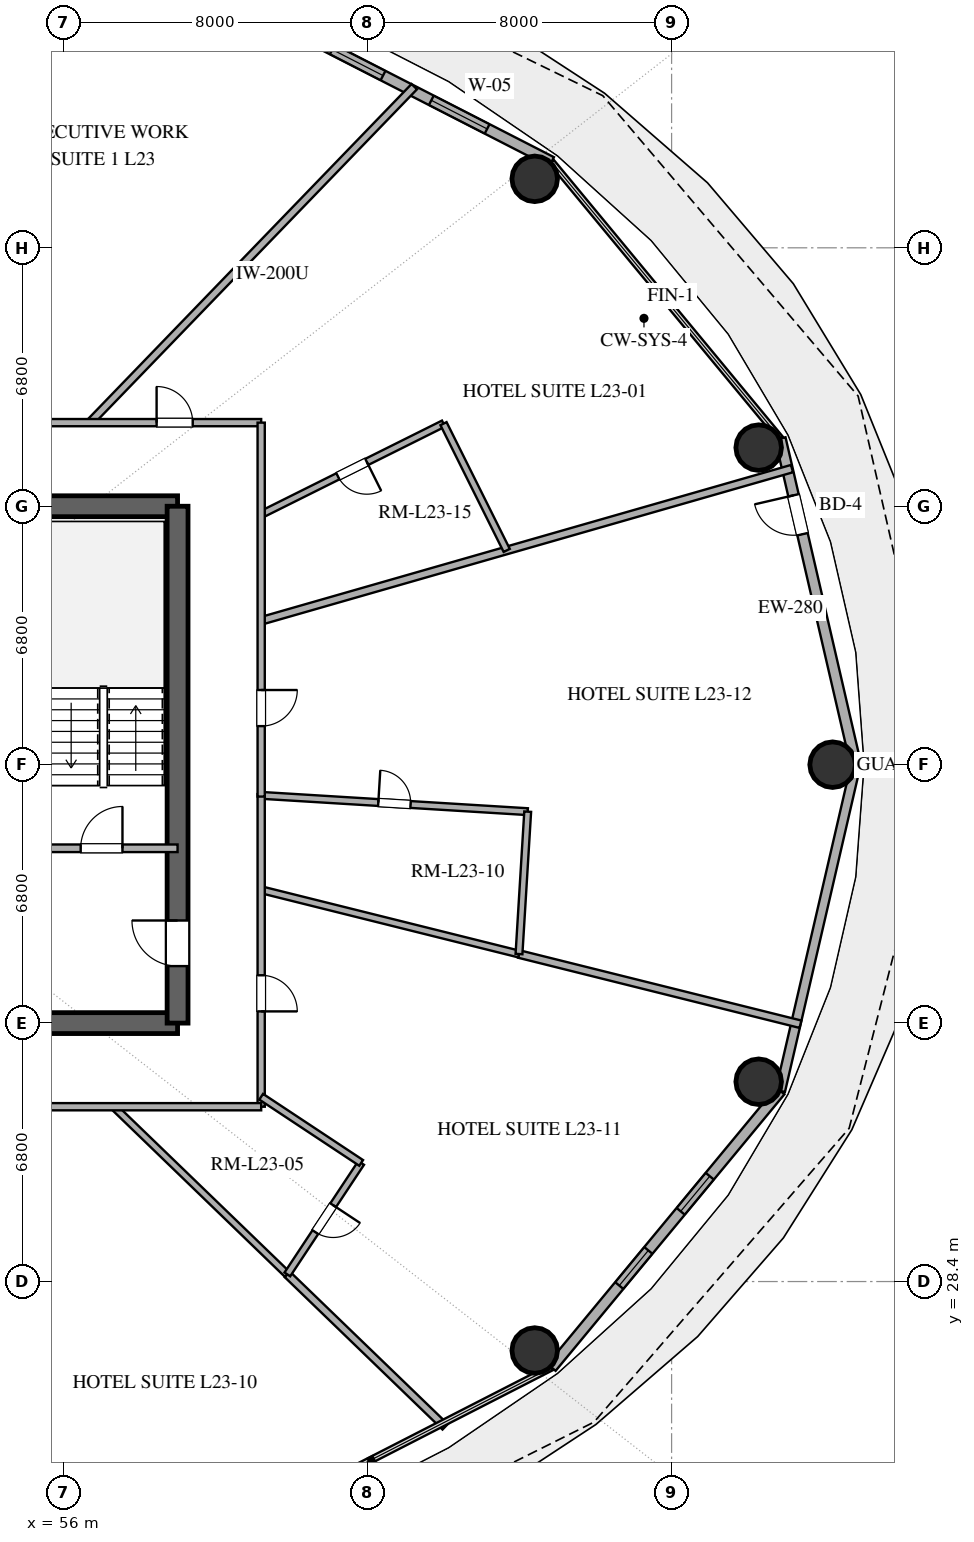
"""IFC4 building model, lengths in metres.
Left out: names, types, materials, properties, quantities, classifications, styles, units other than length and angle.
Written with IfcOpenShell. Run it as: python <this file> out.ifc"""

import sys

from ifc_helpers import new_model, si_unit, direction, frame, frame_2d, origin, origin_2d, place, context, subcontext, project, spatial, rectangle, hollow_circle, extrude, element, fill, save


model = new_model("IFC4")
c1 = context("Model", 3, precision=1e-05, world=origin(), true_north=direction((0.0, 1.0)))
c2 = subcontext(c1, "Body", "Model", "MODEL_VIEW")
j1 = project(units=[si_unit("LENGTHUNIT", "METRE"), si_unit("PLANEANGLEUNIT", "RADIAN")], contexts=[c1])
p1 = place(None, origin())
s1 = spatial("IfcSite", under=j1, at=p1, CompositionType="ELEMENT")
p2 = place(p1, origin())
s2 = spatial("IfcBuilding", under=s1, at=p2, CompositionType="ELEMENT")
p3 = place(p2, frame((0.0, 0.0, 94.8)))
s3 = spatial("IfcBuildingStorey", under=s2, at=p3, CompositionType="ELEMENT", Elevation=94.8)
for number, where, z_axis, x_axis in (
    (1, (55.0, 35.2, 0.0), (0.0, 0.0, 1.0), (1.0, 0.0, 0.0)),
    (2, (55.0, 48.8, 0.0), (0.0, 0.0, 1.0), (1.0, 0.0, 0.0)),
):
    element("IfcWall", number, at=place(p3, frame(where, z_axis=z_axis, x_axis=x_axis)), inside=s3, PredefinedType="SHEAR", context=c2, shape_type="SweptSolid", body=[
        extrude(rectangle(XDim=4.0, YDim=0.55, at=frame_2d((2.0, 0.0))), origin(), (0.0, 0.0, 1.0), 3.38),
    ])
p4 = place(p3, frame((59.0, 35.2, 0.0), z_axis=(0.0, 0.0, 1.0), x_axis=(0.0, 1.0, 0.0)))
e3 = element("IfcWall", 3, at=p4, inside=s3, PredefinedType="SHEAR", context=c2, shape_type="SweptSolid", body=[
    extrude(rectangle(XDim=13.6, YDim=0.55, at=frame_2d((6.8, 0.0))), origin(), (0.0, 0.0, 1.0), 3.38),
])
p5 = place(p4, frame((1.5, 0.0, 0.0)))
e4 = element("IfcOpeningElement", 4, at=p5, cuts=e3, PredefinedType="OPENING", context=c2, shape_type="SweptSolid", body=[
    extrude(rectangle(XDim=1.2, YDim=2.15, at=frame_2d((0.6, 1.075))), frame((0.0, 0.285, 0.0), z_axis=(0.0, -1.0, 0.0), x_axis=(1.0, 0.0, 0.0)), (0.0, 0.0, 1.0), 0.57),
])
for number, where, z_axis, x_axis in (
    (5, (76.237, 42.0, 0.0), (0.0, 0.0, 1.0), (1.0, 0.0, 0.0)),
    (6, (74.291, 50.343, 0.0), (0.0, 0.0, 1.0), (1.0, 0.0, 0.0)),
    (7, (68.398, 57.415, 0.0), (0.0, 0.0, 1.0), (1.0, 0.0, 0.0)),
    (8, (68.398, 26.585, 0.0), (0.0, 0.0, 1.0), (1.0, 0.0, 0.0)),
    (9, (74.291, 33.657, 0.0), (0.0, 0.0, 1.0), (1.0, 0.0, 0.0)),
):
    element("IfcColumn", number, at=place(p3, frame(where, z_axis=z_axis, x_axis=x_axis)), inside=s3, PredefinedType="COLUMN", context=c2, shape_type="SweptSolid", body=[
        extrude(hollow_circle(Radius=0.6, WallThickness=0.032, at=origin_2d()), origin(), (0.0, 0.0, 1.0), 3.38),
    ])
p6 = place(p3, frame((76.849, 42.0, 0.0), z_axis=(0.0, 0.0, 1.0), x_axis=(-0.22558597182, 0.974223264616, 0.0)))
e10 = element("IfcWall", 10, at=p6, inside=s3, PredefinedType="SOLIDWALL", context=c2, shape_type="SweptSolid", body=[
    extrude(rectangle(XDim=8.811, YDim=0.28, at=frame_2d((4.405, 0.0))), origin(), (0.0, 0.0, 1.0), 3.38),
])
p7 = place(p6, frame((6.225, 0.0, 0.0)))
e11 = element("IfcOpeningElement", 11, at=p7, cuts=e10, PredefinedType="OPENING", context=c2, shape_type="SweptSolid", body=[
    extrude(rectangle(XDim=1.05, YDim=2.2, at=frame_2d((0.525, 1.1))), frame((0.0, 0.15, 0.0), z_axis=(0.0, -1.0, 0.0), x_axis=(1.0, 0.0, 0.0)), (0.0, 0.0, 1.0), 0.3),
])
p8 = place(p3, frame((68.84, 57.86, 0.0), z_axis=(0.0, 0.0, 1.0), x_axis=(-0.889959505023, 0.45603955905, 0.0)))
e12 = element("IfcWall", 12, at=p8, inside=s3, PredefinedType="SOLIDWALL", context=c2, shape_type="SweptSolid", body=[
    extrude(rectangle(XDim=10.662, YDim=0.28, at=frame_2d((5.331, 0.0))), origin(), (0.0, 0.0, 1.0), 3.38),
])
p9 = place(p8, frame((1.904, 0.0, 0.85)))
e13 = element("IfcOpeningElement", 13, at=p9, cuts=e12, PredefinedType="OPENING", context=c2, shape_type="SweptSolid", body=[
    extrude(rectangle(XDim=1.65, YDim=2.0, at=frame_2d((0.825, 1.0))), frame((0.0, 0.15, 0.0), z_axis=(0.0, -1.0, 0.0), x_axis=(1.0, 0.0, 0.0)), (0.0, 0.0, 1.0), 0.3),
])
p10 = place(p8, frame((4.982, 0.0, 0.85)))
e14 = element("IfcOpeningElement", 14, at=p10, cuts=e12, PredefinedType="OPENING", context=c2, shape_type="SweptSolid", body=[
    extrude(rectangle(XDim=1.5, YDim=2.0, at=frame_2d((0.75, 1.0))), frame((0.0, 0.15, 0.0), z_axis=(0.0, -1.0, 0.0), x_axis=(1.0, 0.0, 0.0)), (0.0, 0.0, 1.0), 0.3),
])
p11 = place(p8, frame((7.096, 0.0, 0.85)))
e15 = element("IfcOpeningElement", 15, at=p11, cuts=e12, PredefinedType="OPENING", context=c2, shape_type="SweptSolid", body=[
    extrude(rectangle(XDim=1.5, YDim=2.0, at=frame_2d((0.75, 1.0))), frame((0.0, 0.15, 0.0), z_axis=(0.0, -1.0, 0.0), x_axis=(1.0, 0.0, 0.0)), (0.0, 0.0, 1.0), 0.3),
])
p12 = place(p3, frame((68.84, 26.14, 0.0), z_axis=(0.0, 0.0, 1.0), x_axis=(0.637505817448, 0.770445541696, 0.0)))
e16 = element("IfcWall", 16, at=p12, inside=s3, PredefinedType="SOLIDWALL", context=c2, shape_type="SweptSolid", body=[
    extrude(rectangle(XDim=9.445, YDim=0.28, at=frame_2d((4.723, 0.0))), origin(), (0.0, 0.0, 1.0), 3.38),
])
p13 = place(p12, frame((2.797, 0.0, 0.85)))
e17 = element("IfcOpeningElement", 17, at=p13, cuts=e16, PredefinedType="OPENING", context=c2, shape_type="SweptSolid", body=[
    extrude(rectangle(XDim=1.2, YDim=1.8, at=frame_2d((0.6, 0.9))), frame((0.0, 0.15, 0.0), z_axis=(0.0, -1.0, 0.0), x_axis=(1.0, 0.0, 0.0)), (0.0, 0.0, 1.0), 0.3),
])
p14 = place(p12, frame((5.332, 0.0, 0.85)))
e18 = element("IfcOpeningElement", 18, at=p14, cuts=e16, PredefinedType="OPENING", context=c2, shape_type="SweptSolid", body=[
    extrude(rectangle(XDim=1.2, YDim=1.8, at=frame_2d((0.6, 0.9))), frame((0.0, 0.15, 0.0), z_axis=(0.0, -1.0, 0.0), x_axis=(1.0, 0.0, 0.0)), (0.0, 0.0, 1.0), 0.3),
])
p15 = place(p3, frame((74.861, 33.417, 0.0), z_axis=(0.0, 0.0, 1.0), x_axis=(0.22558597182, 0.974223264616, 0.0)))
e19 = element("IfcWall", 19, at=p15, inside=s3, PredefinedType="SOLIDWALL", context=c2, shape_type="SweptSolid", body=[
    extrude(rectangle(XDim=8.811, YDim=0.25, at=frame_2d((4.405, 0.0))), origin(), (0.0, 0.0, 1.0), 3.38),
])
p16 = place(p3, frame((55.0, 39.8, 0.0), z_axis=(0.0, 0.0, 1.0), x_axis=(1.0, 0.0, 0.0)))
e20 = element("IfcWall", 20, at=p16, inside=s3, PredefinedType="SOLIDWALL", context=c2, shape_type="SweptSolid", body=[
    extrude(rectangle(XDim=4.0, YDim=0.2, at=frame_2d((2.0, 0.0))), origin(), (0.0, 0.0, 1.0), 2.74),
])
p17 = place(p16, frame((1.45, 0.0, 0.0)))
e21 = element("IfcOpeningElement", 21, at=p17, cuts=e20, PredefinedType="OPENING", context=c2, shape_type="SweptSolid", body=[
    extrude(rectangle(XDim=1.1, YDim=2.15, at=frame_2d((0.55, 1.075))), frame((0.0, 0.11, 0.0), z_axis=(0.0, -1.0, 0.0), x_axis=(1.0, 0.0, 0.0)), (0.0, 0.0, 1.0), 0.22),
])
p18 = place(p3, frame((65.228, 59.84, 0.0), z_axis=(0.0, 0.0, 1.0), x_axis=(-0.694672506389, -0.719326149161, 0.0)))
e22 = element("IfcWall", 22, at=p18, inside=s3, PredefinedType="PARTITIONING", context=c2, shape_type="SweptSolid", body=[
    extrude(rectangle(XDim=12.289, YDim=0.2, at=frame_2d((6.145, 0.0))), origin(), (0.0, 0.0, 1.0), 2.74),
])
p19 = place(p3, frame((61.2, 45.785, 0.0), z_axis=(0.0, 0.0, 1.0), x_axis=(0.961261030421, 0.275639676741, 0.0)))
e23 = element("IfcWall", 23, at=p19, inside=s3, PredefinedType="PARTITIONING", context=c2, shape_type="SweptSolid", body=[
    extrude(rectangle(XDim=14.531, YDim=0.2, at=frame_2d((7.266, 0.0))), origin(), (0.0, 0.0, 1.0), 2.74),
])
p20 = place(p3, frame((75.391, 35.171, 0.0), z_axis=(0.0, 0.0, 1.0), x_axis=(-0.970302209845, 0.241895889938, 0.0)))
e24 = element("IfcWall", 24, at=p20, inside=s3, PredefinedType="PARTITIONING", context=c2, shape_type="SweptSolid", body=[
    extrude(rectangle(XDim=7.633, YDim=0.2, at=frame_2d((3.817, 0.0))), origin(), (0.0, 0.0, 1.0), 2.74),
])
p21 = place(p3, frame((61.2, 41.193, 0.0), z_axis=(0.0, 0.0, 1.0), x_axis=(0.998134708281, -0.061050013314, 0.0)))
e25 = element("IfcWall", 25, at=p21, inside=s3, PredefinedType="PLUMBINGWALL", context=c2, shape_type="SweptSolid", body=[
    extrude(rectangle(XDim=7.026, YDim=0.18, at=frame_2d((3.513, 0.0))), origin(), (0.0, 0.0, 1.0), 2.74),
])
p22 = place(p21, frame((3.088, 0.0, 0.0)))
e26 = element("IfcOpeningElement", 26, at=p22, cuts=e25, PredefinedType="OPENING", context=c2, shape_type="SweptSolid", body=[
    extrude(rectangle(XDim=0.85, YDim=2.1, at=frame_2d((0.425, 1.05))), frame((0.0, 0.1, 0.0), z_axis=(0.0, -1.0, 0.0), x_axis=(1.0, 0.0, 0.0)), (0.0, 0.0, 1.0), 0.2),
])
p23 = place(p3, frame((67.984, 37.017, 0.0), z_axis=(0.0, 0.0, 1.0), x_axis=(-0.970290206094, 0.241944034764, 0.0)))
e27 = element("IfcWall", 27, at=p23, inside=s3, PredefinedType="PLUMBINGWALL", context=c2, shape_type="SweptSolid", body=[
    extrude(rectangle(XDim=6.992, YDim=0.18, at=frame_2d((3.496, 0.0))), origin(), (0.0, 0.0, 1.0), 2.74),
])
p24 = place(p3, frame((48.518, 51.0, 0.0), z_axis=(0.0, 0.0, 1.0), x_axis=(1.0, 0.0, 0.0)))
e28 = element("IfcWall", 28, at=p24, inside=s3, PredefinedType="PARTITIONING", context=c2, shape_type="SweptSolid", body=[
    extrude(rectangle(XDim=12.682, YDim=0.19, at=frame_2d((6.341, 0.0))), origin(), (0.0, 0.0, 1.0), 2.74),
])
p25 = place(p24, frame((4.455, 0.0, 0.0)))
e29 = element("IfcOpeningElement", 29, at=p25, cuts=e28, PredefinedType="OPENING", context=c2, shape_type="SweptSolid", body=[
    extrude(rectangle(XDim=1.0, YDim=2.2, at=frame_2d((0.5, 1.1))), frame((0.0, 0.105, 0.0), z_axis=(0.0, -1.0, 0.0), x_axis=(1.0, 0.0, 0.0)), (0.0, 0.0, 1.0), 0.21),
])
p26 = place(p24, frame((9.93, 0.0, 0.0)))
e30 = element("IfcOpeningElement", 30, at=p26, cuts=e28, PredefinedType="OPENING", context=c2, shape_type="SweptSolid", body=[
    extrude(rectangle(XDim=0.95, YDim=2.15, at=frame_2d((0.475, 1.075))), frame((0.0, 0.105, 0.0), z_axis=(0.0, -1.0, 0.0), x_axis=(1.0, 0.0, 0.0)), (0.0, 0.0, 1.0), 0.21),
])
p27 = place(p3, frame((61.889, 28.587, 0.0), z_axis=(0.0, 0.0, 1.0), x_axis=(-0.719318009274, 0.694680935059, 0.0)))
e31 = element("IfcWall", 31, at=p27, inside=s3, PredefinedType="PLUMBINGWALL", context=c2, shape_type="SweptSolid", body=[
    extrude(rectangle(XDim=6.352, YDim=0.18, at=frame_2d((3.176, 0.0))), origin(), (0.0, 0.0, 1.0), 2.74),
])
p28 = place(p3, frame((66.041, 24.578, 0.0), z_axis=(0.0, 0.0, 1.0), x_axis=(-0.719370121813, 0.694626970281, 0.0)))
e32 = element("IfcWall", 32, at=p28, inside=s3, PredefinedType="PARTITIONING", context=c2, shape_type="SweptSolid", body=[
    extrude(rectangle(XDim=5.772, YDim=0.2, at=frame_2d((2.886, 0.0))), origin(), (0.0, 0.0, 1.0), 2.74),
])
p29 = place(p3, frame((61.2, 41.225, 0.0), z_axis=(0.0, 0.0, 1.0), x_axis=(0.0, -1.0, 0.0)))
e33 = element("IfcWall", 33, at=p29, inside=s3, PredefinedType="PARTITIONING", context=c2, shape_type="SweptSolid", body=[
    extrude(rectangle(XDim=8.225, YDim=0.19, at=frame_2d((4.112, 0.0))), origin(), (0.0, 0.0, 1.0), 2.74),
])
p30 = place(p29, frame((4.767, 0.0, 0.0)))
e34 = element("IfcOpeningElement", 34, at=p30, cuts=e33, PredefinedType="OPENING", context=c2, shape_type="SweptSolid", body=[
    extrude(rectangle(XDim=0.95, YDim=2.15, at=frame_2d((0.475, 1.075))), frame((0.0, 0.105, 0.0), z_axis=(0.0, -1.0, 0.0), x_axis=(1.0, 0.0, 0.0)), (0.0, 0.0, 1.0), 0.21),
])
p31 = place(p3, frame((65.998, 50.973, 0.0), z_axis=(0.0, 0.0, 1.0), x_axis=(-0.894936648514, -0.446193226244, 0.0)))
e35 = element("IfcWall", 35, at=p31, inside=s3, PredefinedType="PLUMBINGWALL", context=c2, shape_type="SweptSolid", body=[
    extrude(rectangle(XDim=5.361, YDim=0.18, at=frame_2d((2.681, 0.0))), origin(), (0.0, 0.0, 1.0), 2.74),
])
p32 = place(p31, frame((2.256, 0.0, 0.0)))
e36 = element("IfcOpeningElement", 36, at=p32, cuts=e35, PredefinedType="OPENING", context=c2, shape_type="SweptSolid", body=[
    extrude(rectangle(XDim=0.85, YDim=2.1, at=frame_2d((0.425, 1.05))), frame((0.0, 0.1, 0.0), z_axis=(0.0, -1.0, 0.0), x_axis=(1.0, 0.0, 0.0)), (0.0, 0.0, 1.0), 0.2),
])
p33 = place(p3, frame((61.2, 33.0, 0.0), z_axis=(0.0, 0.0, 1.0), x_axis=(-1.0, 0.0, 0.0)))
e37 = element("IfcWall", 37, at=p33, inside=s3, PredefinedType="PARTITIONING", context=c2, shape_type="SweptSolid", body=[
    extrude(rectangle(XDim=10.653, YDim=0.19, at=frame_2d((5.326, 0.0))), origin(), (0.0, 0.0, 1.0), 2.74),
])
p34 = place(p33, frame((5.816, 0.0, 0.0)))
e38 = element("IfcOpeningElement", 38, at=p34, cuts=e37, PredefinedType="OPENING", context=c2, shape_type="SweptSolid", body=[
    extrude(rectangle(XDim=0.95, YDim=2.15, at=frame_2d((0.475, 1.075))), frame((0.0, 0.105, 0.0), z_axis=(0.0, -1.0, 0.0), x_axis=(1.0, 0.0, 0.0)), (0.0, 0.0, 1.0), 0.21),
])
p35 = place(p3, frame((61.2, 51.0, 0.0), z_axis=(0.0, 0.0, 1.0), x_axis=(0.0, -1.0, 0.0)))
e39 = element("IfcWall", 39, at=p35, inside=s3, PredefinedType="PARTITIONING", context=c2, shape_type="SweptSolid", body=[
    extrude(rectangle(XDim=9.839, YDim=0.19, at=frame_2d((4.92, 0.0))), origin(), (0.0, 0.0, 1.0), 2.74),
])
p36 = place(p35, frame((7.035, 0.0, 0.0)))
e40 = element("IfcOpeningElement", 40, at=p36, cuts=e39, PredefinedType="OPENING", context=c2, shape_type="SweptSolid", body=[
    extrude(rectangle(XDim=0.95, YDim=2.15, at=frame_2d((0.475, 1.075))), frame((0.0, 0.105, 0.0), z_axis=(0.0, -1.0, 0.0), x_axis=(1.0, 0.0, 0.0)), (0.0, 0.0, 1.0), 0.21),
])
p37 = place(p3, frame((68.213, 40.764, 0.0), z_axis=(0.0, 0.0, 1.0), x_axis=(-0.061013519028, -0.998136939751, 0.0)))
e41 = element("IfcWall", 41, at=p37, inside=s3, PredefinedType="PLUMBINGWALL", context=c2, shape_type="SweptSolid", body=[
    extrude(rectangle(XDim=3.753, YDim=0.18, at=frame_2d((1.877, 0.0))), origin(), (0.0, 0.0, 1.0), 2.74),
])
p38 = place(p3, frame((67.661, 47.638, 0.0), z_axis=(0.0, 0.0, 1.0), x_axis=(-0.446243949247, 0.894911357488, 0.0)))
e42 = element("IfcWall", 42, at=p38, inside=s3, PredefinedType="PLUMBINGWALL", context=c2, shape_type="SweptSolid", body=[
    extrude(rectangle(XDim=3.727, YDim=0.18, at=frame_2d((1.864, 0.0))), origin(), (0.0, 0.0, 1.0), 2.74),
])
p39 = place(p3, frame((63.831, 31.521, 0.0), z_axis=(0.0, 0.0, 1.0), x_axis=(-0.551959146688, -0.833871153349, 0.0)))
e43 = element("IfcWall", 43, at=p39, inside=s3, PredefinedType="PLUMBINGWALL", context=c2, shape_type="SweptSolid", body=[
    extrude(rectangle(XDim=3.519, YDim=0.18, at=frame_2d((1.759, 0.0))), origin(), (0.0, 0.0, 1.0), 2.74),
])
p40 = place(p39, frame((1.334, 0.0, 0.0)))
e44 = element("IfcOpeningElement", 44, at=p40, cuts=e43, PredefinedType="OPENING", context=c2, shape_type="SweptSolid", body=[
    extrude(rectangle(XDim=0.85, YDim=2.1, at=frame_2d((0.425, 1.05))), frame((0.0, 0.1, 0.0), z_axis=(0.0, -1.0, 0.0), x_axis=(1.0, 0.0, 0.0)), (0.0, 0.0, 1.0), 0.2),
])
p41 = place(p3, frame((61.2, 33.263, 0.0), z_axis=(0.0, 0.0, 1.0), x_axis=(0.833855219674, -0.5519832177, 0.0)))
e45 = element("IfcWall", 45, at=p41, inside=s3, PredefinedType="PLUMBINGWALL", context=c2, shape_type="SweptSolid", body=[
    extrude(rectangle(XDim=3.155, YDim=0.18, at=frame_2d((1.578, 0.0))), origin(), (0.0, 0.0, 1.0), 2.74),
])
p42 = place(p7, origin())
e46 = element("IfcDoor", 46, at=p42, inside=s3, OperationType="SINGLE_SWING_RIGHT", PredefinedType="DOOR", context=c2, shape_type="SweptSolid", body=[
    extrude(rectangle(XDim=1.05, YDim=2.2, at=frame_2d((0.525, 1.1))), frame((0.0, 0.025, 0.0), z_axis=(0.0, -1.0, 0.0), x_axis=(1.0, 0.0, 0.0)), (0.0, 0.0, 1.0), 0.05),
])
fill(e11, e46)
p43 = place(p9, origin())
e47 = element("IfcWindow", 47, at=p43, inside=s3, PartitioningType="SINGLE_PANEL", PredefinedType="WINDOW", context=c2, shape_type="SweptSolid", body=[
    extrude(rectangle(XDim=1.65, YDim=2.0, at=frame_2d((0.825, 1.0))), frame((0.0, 0.03, 0.0), z_axis=(0.0, -1.0, 0.0), x_axis=(1.0, 0.0, 0.0)), (0.0, 0.0, 1.0), 0.06),
])
fill(e13, e47)
p44 = place(p10, origin())
e48 = element("IfcWindow", 48, at=p44, inside=s3, PartitioningType="SINGLE_PANEL", PredefinedType="WINDOW", context=c2, shape_type="SweptSolid", body=[
    extrude(rectangle(XDim=1.5, YDim=2.0, at=frame_2d((0.75, 1.0))), frame((0.0, 0.03, 0.0), z_axis=(0.0, -1.0, 0.0), x_axis=(1.0, 0.0, 0.0)), (0.0, 0.0, 1.0), 0.06),
])
fill(e14, e48)
p45 = place(p13, origin())
e49 = element("IfcWindow", 49, at=p45, inside=s3, PartitioningType="SINGLE_PANEL", PredefinedType="WINDOW", context=c2, shape_type="SweptSolid", body=[
    extrude(rectangle(XDim=1.2, YDim=1.8, at=frame_2d((0.6, 0.9))), frame((0.0, 0.03, 0.0), z_axis=(0.0, -1.0, 0.0), x_axis=(1.0, 0.0, 0.0)), (0.0, 0.0, 1.0), 0.06),
])
fill(e17, e49)
p46 = place(p14, origin())
e50 = element("IfcWindow", 50, at=p46, inside=s3, PartitioningType="SINGLE_PANEL", PredefinedType="WINDOW", context=c2, shape_type="SweptSolid", body=[
    extrude(rectangle(XDim=1.2, YDim=1.8, at=frame_2d((0.6, 0.9))), frame((0.0, 0.03, 0.0), z_axis=(0.0, -1.0, 0.0), x_axis=(1.0, 0.0, 0.0)), (0.0, 0.0, 1.0), 0.06),
])
fill(e18, e50)
p47 = place(p5, origin())
e51 = element("IfcDoor", 51, at=p47, inside=s3, OperationType="SINGLE_SWING_RIGHT", PredefinedType="DOOR", context=c2, shape_type="SweptSolid", body=[
    extrude(rectangle(XDim=1.2, YDim=2.15, at=frame_2d((0.6, 1.075))), frame((0.0, 0.025, 0.0), z_axis=(0.0, -1.0, 0.0), x_axis=(1.0, 0.0, 0.0)), (0.0, 0.0, 1.0), 0.05),
])
fill(e4, e51)
p48 = place(p17, origin())
e52 = element("IfcDoor", 52, at=p48, inside=s3, OperationType="SINGLE_SWING_RIGHT", PredefinedType="DOOR", context=c2, shape_type="SweptSolid", body=[
    extrude(rectangle(XDim=1.1, YDim=2.15, at=frame_2d((0.55, 1.075))), frame((0.0, 0.025, 0.0), z_axis=(0.0, -1.0, 0.0), x_axis=(1.0, 0.0, 0.0)), (0.0, 0.0, 1.0), 0.05),
])
fill(e21, e52)
p49 = place(p22, origin())
e53 = element("IfcDoor", 53, at=p49, inside=s3, OperationType="SINGLE_SWING_LEFT", PredefinedType="DOOR", context=c2, shape_type="SweptSolid", body=[
    extrude(rectangle(XDim=0.85, YDim=2.1, at=frame_2d((0.425, 1.05))), frame((0.0, 0.025, 0.0), z_axis=(0.0, -1.0, 0.0), x_axis=(1.0, 0.0, 0.0)), (0.0, 0.0, 1.0), 0.05),
])
fill(e26, e53)
p50 = place(p26, origin())
e54 = element("IfcDoor", 54, at=p50, inside=s3, OperationType="SINGLE_SWING_LEFT", PredefinedType="DOOR", context=c2, shape_type="SweptSolid", body=[
    extrude(rectangle(XDim=0.95, YDim=2.15, at=frame_2d((0.475, 1.075))), frame((0.0, 0.025, 0.0), z_axis=(0.0, -1.0, 0.0), x_axis=(1.0, 0.0, 0.0)), (0.0, 0.0, 1.0), 0.05),
])
fill(e30, e54)
p51 = place(p30, origin())
e55 = element("IfcDoor", 55, at=p51, inside=s3, OperationType="SINGLE_SWING_RIGHT", PredefinedType="DOOR", context=c2, shape_type="SweptSolid", body=[
    extrude(rectangle(XDim=0.95, YDim=2.15, at=frame_2d((0.475, 1.075))), frame((0.0, 0.025, 0.0), z_axis=(0.0, -1.0, 0.0), x_axis=(1.0, 0.0, 0.0)), (0.0, 0.0, 1.0), 0.05),
])
fill(e34, e55)
p52 = place(p32, origin())
e56 = element("IfcDoor", 56, at=p52, inside=s3, OperationType="SINGLE_SWING_LEFT", PredefinedType="DOOR", context=c2, shape_type="SweptSolid", body=[
    extrude(rectangle(XDim=0.85, YDim=2.1, at=frame_2d((0.425, 1.05))), frame((0.0, 0.025, 0.0), z_axis=(0.0, -1.0, 0.0), x_axis=(1.0, 0.0, 0.0)), (0.0, 0.0, 1.0), 0.05),
])
fill(e36, e56)
p53 = place(p36, origin())
e57 = element("IfcDoor", 57, at=p53, inside=s3, OperationType="SINGLE_SWING_LEFT", PredefinedType="DOOR", context=c2, shape_type="SweptSolid", body=[
    extrude(rectangle(XDim=0.95, YDim=2.15, at=frame_2d((0.475, 1.075))), frame((0.0, 0.025, 0.0), z_axis=(0.0, -1.0, 0.0), x_axis=(1.0, 0.0, 0.0)), (0.0, 0.0, 1.0), 0.05),
])
fill(e40, e57)
p54 = place(p40, origin())
e58 = element("IfcDoor", 58, at=p54, inside=s3, OperationType="SINGLE_SWING_LEFT", PredefinedType="DOOR", context=c2, shape_type="SweptSolid", body=[
    extrude(rectangle(XDim=0.85, YDim=2.1, at=frame_2d((0.425, 1.05))), frame((0.0, 0.025, 0.0), z_axis=(0.0, -1.0, 0.0), x_axis=(1.0, 0.0, 0.0)), (0.0, 0.0, 1.0), 0.05),
])
fill(e44, e58)
save(model, sys.argv[1])
